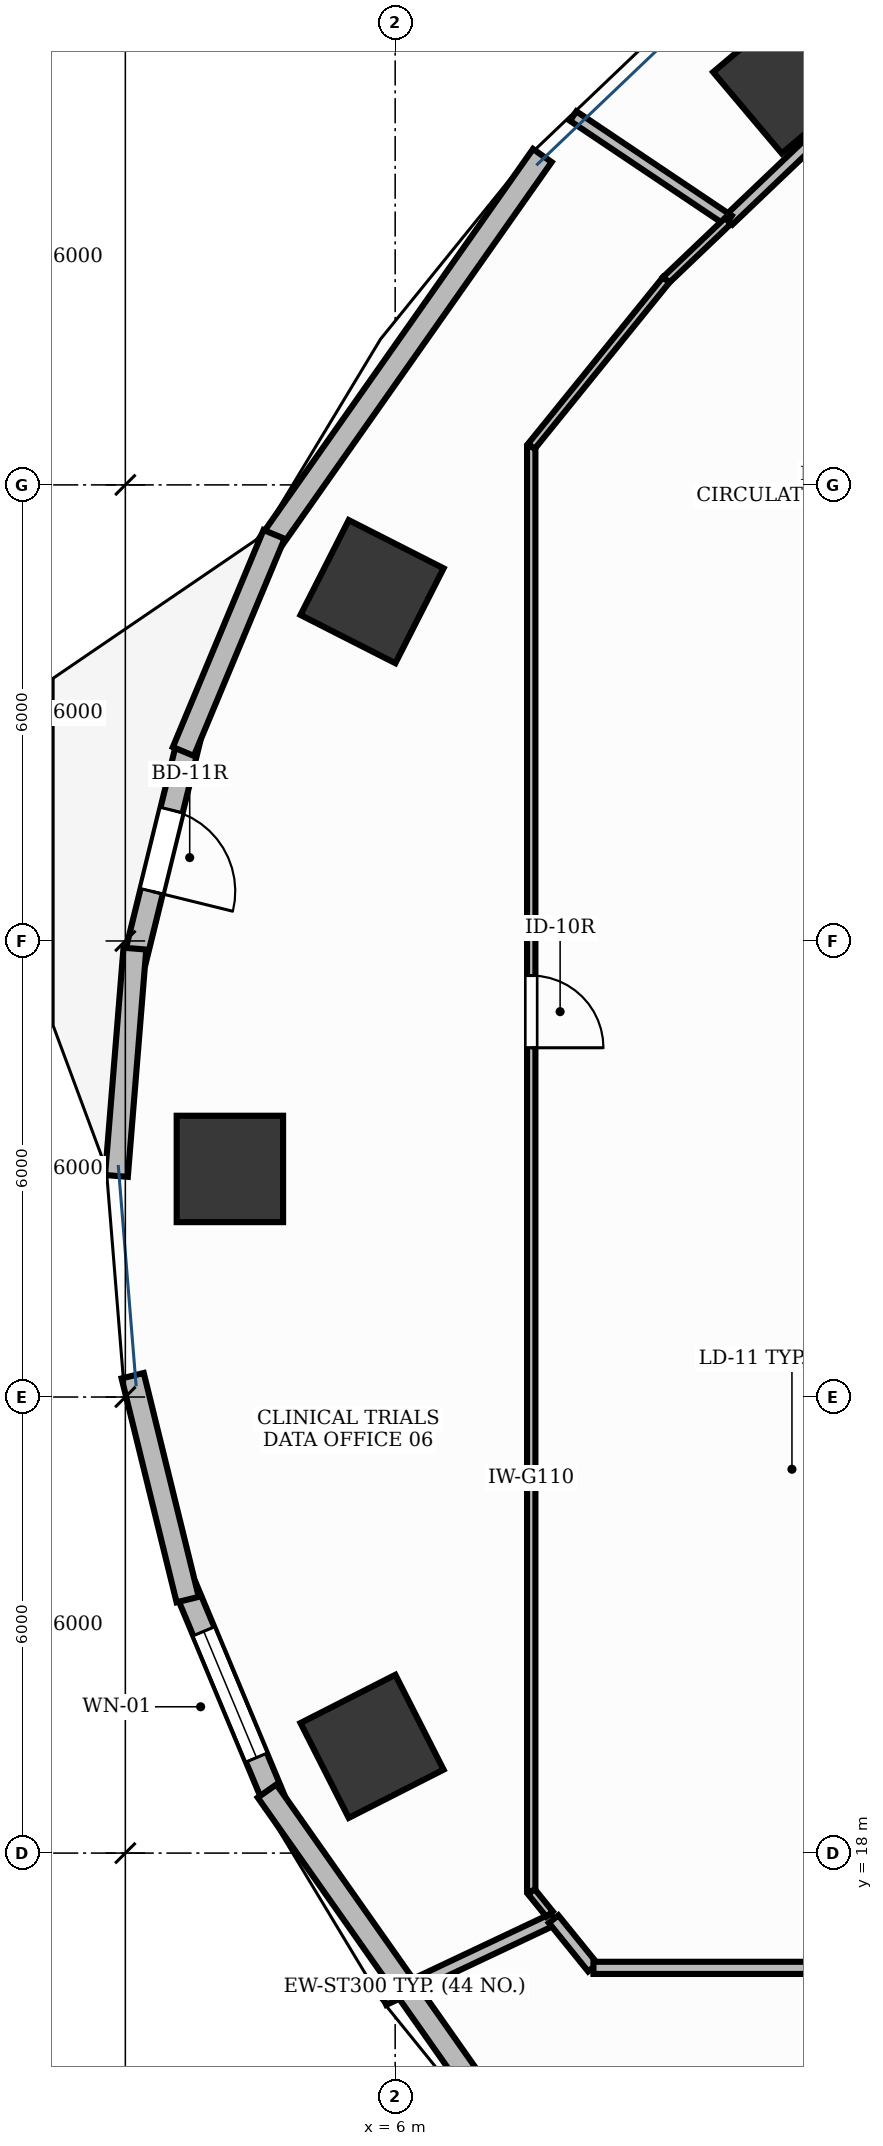
"""IFC4 building model, lengths in metres.
Left out: names, types, materials, properties, quantities, classifications, styles, units other than length and angle.
Written with IfcOpenShell. Run it as: python <this file> out.ifc"""

import sys

from ifc_helpers import new_model, si_unit, direction, frame, frame_2d, origin, origin_2d, place, context, subcontext, project, spatial, rectangle, extrude, element, fill, save


model = new_model("IFC4")
c1 = context("Model", 3, precision=1e-05, world=origin(), true_north=direction((0.0, 1.0)))
c2 = subcontext(c1, "Body", "Model", "MODEL_VIEW")
j1 = project(units=[si_unit("LENGTHUNIT", "METRE"), si_unit("PLANEANGLEUNIT", "RADIAN")], contexts=[c1])
p1 = place(None, origin())
s1 = spatial("IfcSite", under=j1, at=p1, CompositionType="ELEMENT")
p2 = place(p1, origin())
s2 = spatial("IfcBuilding", under=s1, at=p2, CompositionType="ELEMENT")
p3 = place(p2, frame((0.0, 0.0, 67.8)))
s3 = spatial("IfcBuildingStorey", under=s2, at=p3, CompositionType="ELEMENT", Elevation=67.8)
for number, where, z_axis, x_axis in (
    (1, (11.17, 41.347, -0.0), (0.0, 0.0, 1.0), (0.764, 0.645, 0.0)),
    (2, (5.696, 34.596, -0.0), (0.0, 0.0, 1.0), (0.453, 0.891, 0.0)),
    (3, (3.825, 27.001, -0.0), (0.0, 0.0, 1.0), (0.0, 1.0, 0.0)),
    (4, (5.696, 19.404, -0.0), (0.0, 0.0, 1.0), (-0.453, 0.891, 0.0)),
):
    element("IfcColumn", number, at=place(p3, frame(where, z_axis=z_axis, x_axis=x_axis)), inside=s3, PredefinedType="COLUMN", context=c2, shape_type="SweptSolid", body=[
        extrude(rectangle(XDim=1.4, YDim=1.4, at=origin_2d()), origin(), (0.0, 0.0, 1.0), 3.901),
    ])
p4 = place(p3, frame((3.285, 32.641, 0.0), z_axis=(0.0, 0.0, 1.0), x_axis=(-0.238522035896, -0.971137085273, 0.0)))
e5 = element("IfcWall", 5, at=p4, inside=s3, PredefinedType="STANDARD", context=c2, shape_type="SweptSolid", body=[
    extrude(rectangle(XDim=2.993, YDim=0.3, at=frame_2d((1.497, 0.0))), origin(), (0.0, 0.0, 1.0), 3.9),
])
p5 = place(p4, frame((0.946, 0.0, 0.0)))
e6 = element("IfcOpeningElement", 6, at=p5, cuts=e5, PredefinedType="OPENING", context=c2, shape_type="SweptSolid", body=[
    extrude(rectangle(XDim=1.1, YDim=2.15, at=frame_2d((0.55, 1.075))), frame((0.0, 0.165, 0.0), z_axis=(0.0, -1.0, 0.0), x_axis=(1.0, 0.0, 0.0)), (0.0, 0.0, 1.0), 0.33),
])
p6 = place(p3, frame((3.24, 21.497, 0.0), z_axis=(0.0, 0.0, 1.0), x_axis=(0.385358473275, -0.92276695166, 0.0)))
e7 = element("IfcWall", 7, at=p6, inside=s3, PredefinedType="STANDARD", context=c2, shape_type="SweptSolid", body=[
    extrude(rectangle(XDim=3.056, YDim=0.3, at=frame_2d((1.528, 0.0))), origin(), (0.0, 0.0, 1.0), 3.47),
])
p7 = place(p6, frame((0.628, 0.0, 0.9)))
e8 = element("IfcOpeningElement", 8, at=p7, cuts=e7, PredefinedType="OPENING", context=c2, shape_type="SweptSolid", body=[
    extrude(rectangle(XDim=1.8, YDim=2.1, at=frame_2d((0.9, 1.05))), frame((0.0, 0.165, 0.0), z_axis=(0.0, -1.0, 0.0), x_axis=(1.0, 0.0, 0.0)), (0.0, 0.0, 1.0), 0.33),
])
p8 = place(p3, frame((7.936, 40.333, 0.0), z_axis=(0.0, 0.0, 1.0), x_axis=(-0.575165804445, -0.818036855769, 0.0)))
e9 = element("IfcWall", 9, at=p8, inside=s3, PredefinedType="STANDARD", context=c2, shape_type="SweptSolid", body=[
    extrude(rectangle(XDim=6.296, YDim=0.3, at=frame_2d((3.148, 0.0))), origin(), (0.0, 0.0, 1.0), 3.9),
])
p9 = place(p3, frame((4.406, 35.349, 0.0), z_axis=(0.0, 0.0, 1.0), x_axis=(-0.38535448421, -0.922768617531, 0.0)))
e10 = element("IfcWall", 10, at=p9, inside=s3, PredefinedType="STANDARD", context=c2, shape_type="SweptSolid", body=[
    extrude(rectangle(XDim=3.095, YDim=0.3, at=frame_2d((1.548, 0.0))), origin(), (0.0, 0.0, 1.0), 3.9),
])
p10 = place(p3, frame((2.576, 29.899, 0.0), z_axis=(0.0, 0.0, 1.0), x_axis=(-0.080890160317, -0.996723021689, 0.0)))
e11 = element("IfcWall", 11, at=p10, inside=s3, PredefinedType="STANDARD", context=c2, shape_type="SweptSolid", body=[
    extrude(rectangle(XDim=3.0, YDim=0.3, at=frame_2d((1.5, 0.0))), origin(), (0.0, 0.0, 1.0), 3.9),
])
p11 = place(p3, frame((2.546, 24.281, 0.0), z_axis=(0.0, 0.0, 1.0), x_axis=(0.23859399274, -0.971119409047, 0.0)))
e12 = element("IfcWall", 12, at=p11, inside=s3, PredefinedType="STANDARD", context=c2, shape_type="SweptSolid", body=[
    extrude(rectangle(XDim=3.033, YDim=0.3, at=frame_2d((1.517, 0.0))), origin(), (0.0, 0.0, 1.0), 3.47),
])
p12 = place(p3, frame((4.315, 18.817, 0.0), z_axis=(0.0, 0.0, 1.0), x_axis=(0.575165804445, -0.818036855769, 0.0)))
e13 = element("IfcWall", 13, at=p12, inside=s3, PredefinedType="STANDARD", context=c2, shape_type="SweptSolid", body=[
    extrude(rectangle(XDim=6.296, YDim=0.3, at=frame_2d((3.148, 0.0))), origin(), (0.0, 0.0, 1.0), 3.9),
])
p13 = place(p3, frame((7.79, 36.501, 0.0), z_axis=(0.0, 0.0, 1.0), x_axis=(0.0, -1.0, 0.0)))
e14 = element("IfcWall", 14, at=p13, inside=s3, PredefinedType="MOVABLE", context=c2, shape_type="SweptSolid", body=[
    extrude(rectangle(XDim=19.002, YDim=0.11, at=frame_2d((9.501, 0.0))), origin(), (0.0, 0.0, 1.0), 2.91),
])
p14 = place(p13, frame((6.956, 0.0, 0.0)))
e15 = element("IfcOpeningElement", 15, at=p14, cuts=e14, PredefinedType="OPENING", context=c2, shape_type="SweptSolid", body=[
    extrude(rectangle(XDim=0.95, YDim=2.15, at=frame_2d((0.475, 1.075))), frame((0.0, 0.07, 0.0), z_axis=(0.0, -1.0, 0.0), x_axis=(1.0, 0.0, 0.0)), (0.0, 0.0, 1.0), 0.14),
])
p15 = place(p3, frame((5.848, 16.076, 0.0), z_axis=(0.0, 0.0, 1.0), x_axis=(0.904251823465, 0.426999578173, 0.0)))
e16 = element("IfcWall", 16, at=p15, inside=s3, PredefinedType="PARTITIONING", context=c2, shape_type="SweptSolid", body=[
    extrude(rectangle(XDim=2.473, YDim=0.16, at=frame_2d((1.236, 0.0))), origin(), (0.0, 0.0, 1.0), 2.91),
])
p16 = place(p3, frame((8.084, 17.132, 0.0), z_axis=(0.0, 0.0, 1.0), x_axis=(0.629146883335, -0.77728643317, 0.0)))
e17 = element("IfcWall", 17, at=p16, inside=s3, PredefinedType="PARTITIONING", context=c2, shape_type="SweptSolid", body=[
    extrude(rectangle(XDim=0.821, YDim=0.16, at=frame_2d((0.41, 0.0))), origin(), (0.0, 0.0, 1.0), 2.91),
])
p17 = place(p3, frame((8.609, 16.49, 0.0), z_axis=(0.0, 0.0, 1.0), x_axis=(1.0, 0.0, 0.0)))
e18 = element("IfcWall", 18, at=p17, inside=s3, PredefinedType="PARTITIONING", context=c2, shape_type="SweptSolid", body=[
    extrude(rectangle(XDim=2.971, YDim=0.16, at=frame_2d((1.486, 0.0))), origin(), (0.0, 0.0, 1.0), 2.91),
])
p18 = place(p3, frame((11.693, 40.727, 0.0), z_axis=(0.0, 0.0, 1.0), x_axis=(-0.723662214514, -0.690154330048, 0.0)))
e19 = element("IfcWall", 19, at=p18, inside=s3, PredefinedType="PARTITIONING", context=c2, shape_type="SweptSolid", body=[
    extrude(rectangle(XDim=1.807, YDim=0.15, at=frame_2d((0.903, 0.0))), origin(), (0.0, 0.0, 1.0), 2.91),
])
p19 = place(p3, frame((10.386, 39.48, 0.0), z_axis=(0.0, 0.0, 1.0), x_axis=(-0.830276202789, 0.557352157152, 0.0)))
e20 = element("IfcWall", 20, at=p19, inside=s3, PredefinedType="PARTITIONING", context=c2, shape_type="SweptSolid", body=[
    extrude(rectangle(XDim=2.462, YDim=0.15, at=frame_2d((1.231, 0.0))), origin(), (0.0, 0.0, 1.0), 2.91),
])
p20 = place(p3, frame((10.378, 39.473, 0.0), z_axis=(0.0, 0.0, 1.0), x_axis=(-0.723760277906, -0.690051490924, 0.0)))
e21 = element("IfcWall", 21, at=p20, inside=s3, PredefinedType="MOVABLE", context=c2, shape_type="SweptSolid", body=[
    extrude(rectangle(XDim=1.123, YDim=0.11, at=frame_2d((0.561, 0.0))), origin(), (0.0, 0.0, 1.0), 2.91),
])
p21 = place(p3, frame((9.565, 38.697, 0.0), z_axis=(0.0, 0.0, 1.0), x_axis=(-0.629270515505, -0.777186347227, 0.0)))
e22 = element("IfcWall", 22, at=p21, inside=s3, PredefinedType="MOVABLE", context=c2, shape_type="SweptSolid", body=[
    extrude(rectangle(XDim=2.817, YDim=0.11, at=frame_2d((1.409, 0.0))), origin(), (0.0, 0.0, 1.0), 2.91),
])
p22 = place(p3, frame((7.792, 17.492, 0.0), z_axis=(0.0, 0.0, 1.0), x_axis=(0.629086970035, -0.77733492404, 0.0)))
e23 = element("IfcWall", 23, at=p22, inside=s3, PredefinedType="MOVABLE", context=c2, shape_type="SweptSolid", body=[
    extrude(rectangle(XDim=0.379, YDim=0.11, at=frame_2d((0.189, 0.0))), origin(), (0.0, 0.0, 1.0), 2.91),
])
p23 = place(p5, origin())
e24 = element("IfcDoor", 24, at=p23, inside=s3, OperationType="SINGLE_SWING_RIGHT", PredefinedType="DOOR", context=c2, shape_type="SweptSolid", body=[
    extrude(rectangle(XDim=1.1, YDim=2.15, at=frame_2d((0.55, 1.075))), frame((0.0, 0.025, 0.0), z_axis=(0.0, -1.0, 0.0), x_axis=(1.0, 0.0, 0.0)), (0.0, 0.0, 1.0), 0.05),
])
fill(e6, e24)
p24 = place(p7, origin())
e25 = element("IfcWindow", 25, at=p24, inside=s3, PartitioningType="SINGLE_PANEL", PredefinedType="WINDOW", context=c2, shape_type="SweptSolid", body=[
    extrude(rectangle(XDim=1.8, YDim=2.1, at=frame_2d((0.9, 1.05))), frame((0.0, 0.03, 0.0), z_axis=(0.0, -1.0, 0.0), x_axis=(1.0, 0.0, 0.0)), (0.0, 0.0, 1.0), 0.06),
])
fill(e8, e25)
p25 = place(p14, origin())
e26 = element("IfcDoor", 26, at=p25, inside=s3, OperationType="SINGLE_SWING_RIGHT", PredefinedType="DOOR", context=c2, shape_type="SweptSolid", body=[
    extrude(rectangle(XDim=0.95, YDim=2.15, at=frame_2d((0.475, 1.075))), frame((0.0, 0.025, 0.0), z_axis=(0.0, -1.0, 0.0), x_axis=(1.0, 0.0, 0.0)), (0.0, 0.0, 1.0), 0.05),
])
fill(e15, e26)
save(model, sys.argv[1])
